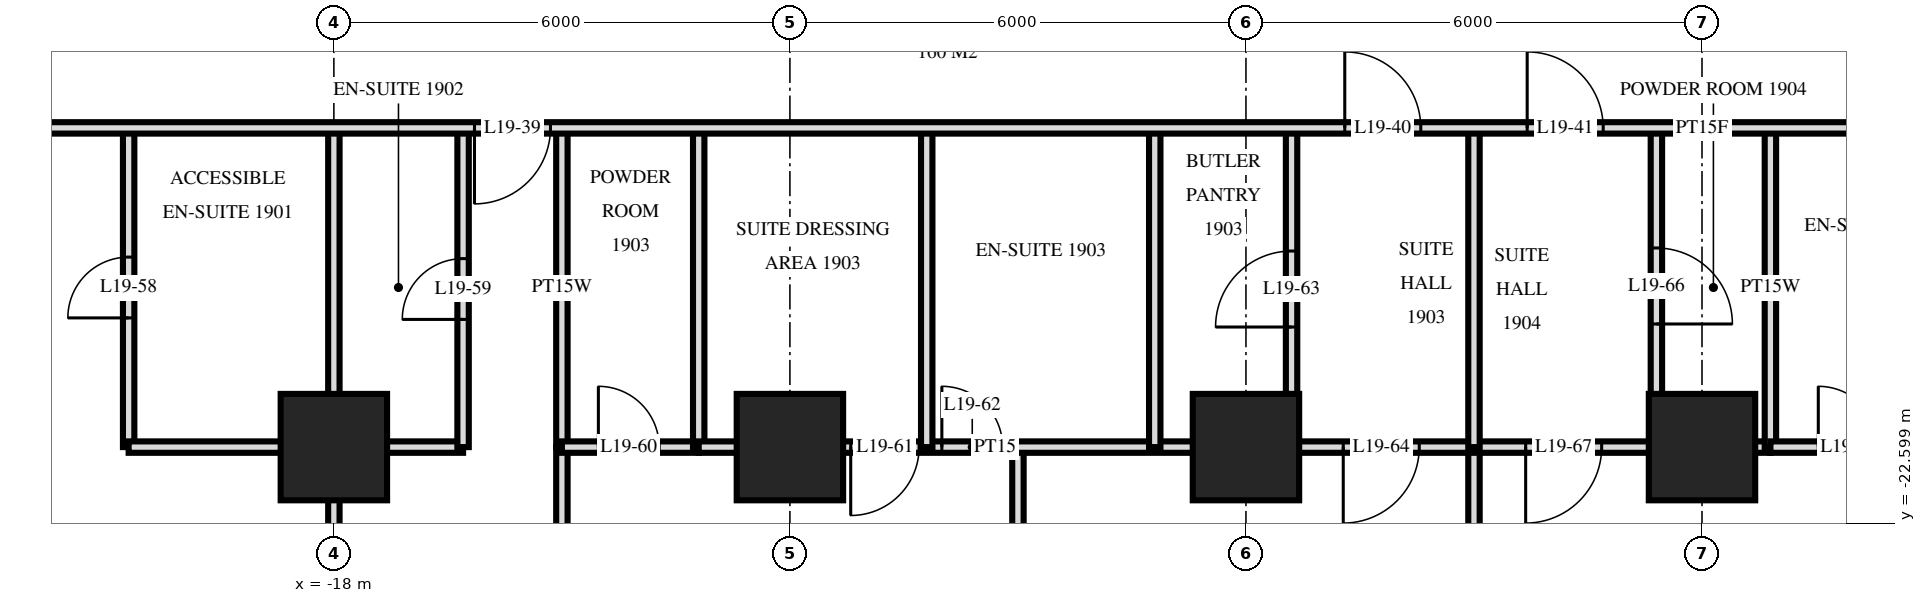
"""IFC4 building model, lengths in metres.
Left out: names, types, materials, properties, quantities, classifications, styles, units other than length and angle.
Written with IfcOpenShell. Run it as: python <this file> out.ifc"""

import sys

from ifc_helpers import new_model, si_unit, direction, frame, frame_2d, origin, origin_2d, place, context, subcontext, project, spatial, rectangle, extrude, element, fill, save


model = new_model("IFC4")
c1 = context("Model", 3, precision=1e-05, world=origin(), true_north=direction((0.0, 1.0)))
c2 = subcontext(c1, "Body", "Model", "MODEL_VIEW")
j1 = project(units=[si_unit("LENGTHUNIT", "METRE"), si_unit("PLANEANGLEUNIT", "RADIAN")], contexts=[c1])
p1 = place(None, origin())
s1 = spatial("IfcSite", under=j1, at=p1, CompositionType="ELEMENT")
p2 = place(p1, origin())
s2 = spatial("IfcBuilding", under=s1, at=p2, CompositionType="ELEMENT")
p3 = place(p2, frame((0.0, 0.0, 78.0)))
s3 = spatial("IfcBuildingStorey", under=s2, at=p3, CompositionType="ELEMENT", Elevation=78.0)
for number, where, z_axis, x_axis in (
    (1, (-18.0, -21.6, 0.0), (0.0, 0.0, 1.0), (1.0, 0.0, 0.0)),
    (2, (-12.0, -21.6, 0.0), (0.0, 0.0, 1.0), (1.0, 0.0, 0.0)),
    (3, (-6.0, -21.6, 0.0), (0.0, 0.0, 1.0), (1.0, 0.0, 0.0)),
    (4, (0.0, -21.6, 0.0), (0.0, 0.0, 1.0), (1.0, 0.0, 0.0)),
):
    element("IfcColumn", number, at=place(p3, frame(where, z_axis=z_axis, x_axis=x_axis)), inside=s3, PredefinedType="COLUMN", context=c2, shape_type="SweptSolid", body=[
        extrude(rectangle(XDim=1.4, YDim=1.4, at=origin_2d()), origin(), (0.0, 0.0, 1.0), 3.6),
    ])
p4 = place(p3, frame((0.9, -21.6, 0.0), z_axis=(0.0, 0.0, 1.0), x_axis=(0.0, 1.0, 0.0)))
e5 = element("IfcWall", 5, at=p4, inside=s3, PredefinedType="PLUMBINGWALL", context=c2, shape_type="SweptSolid", body=[
    extrude(rectangle(XDim=4.2, YDim=0.15, at=frame_2d((2.1, 0.0))), origin(), (0.0, 0.0, 1.0), 3.32),
])
p5 = place(p3, frame((-0.6, -21.6, 0.0), z_axis=(0.0, 0.0, 1.0), x_axis=(0.0, 1.0, 0.0)))
e6 = element("IfcWall", 6, at=p5, inside=s3, PredefinedType="PARTITIONING", context=c2, shape_type="SweptSolid", body=[
    extrude(rectangle(XDim=4.2, YDim=0.15, at=frame_2d((2.1, 0.0))), origin(), (0.0, 0.0, 1.0), 3.32),
])
p6 = place(p5, frame((1.62, 0.0, 0.0)))
e7 = element("IfcOpeningElement", 7, at=p6, cuts=e6, PredefinedType="OPENING", context=c2, shape_type="SweptSolid", body=[
    extrude(rectangle(XDim=1.0, YDim=2.1, at=frame_2d((0.5, 1.05))), frame((0.0, 0.085, 0.0), z_axis=(0.0, -1.0, 0.0), x_axis=(1.0, 0.0, 0.0)), (0.0, 0.0, 1.0), 0.17),
])
p7 = place(p3, frame((-3.0, -21.6, 0.0), z_axis=(0.0, 0.0, 1.0), x_axis=(0.0, 1.0, 0.0)))
e8 = element("IfcWall", 8, at=p7, inside=s3, PredefinedType="PARTITIONING", context=c2, shape_type="SweptSolid", body=[
    extrude(rectangle(XDim=4.2, YDim=0.15, at=frame_2d((2.1, 0.0))), origin(), (0.0, 0.0, 1.0), 3.32),
])
p8 = place(p3, frame((-3.0, -29.22, 0.0), z_axis=(0.0, 0.0, 1.0), x_axis=(0.0, 1.0, 0.0)))
e9 = element("IfcWall", 9, at=p8, inside=s3, PredefinedType="PARTITIONING", context=c2, shape_type="SweptSolid", body=[
    extrude(rectangle(XDim=7.62, YDim=0.15, at=frame_2d((3.81, 0.0))), origin(), (0.0, 0.0, 1.0), 3.32),
])
p9 = place(p3, frame((-5.4, -21.6, 0.0), z_axis=(0.0, 0.0, 1.0), x_axis=(0.0, 1.0, 0.0)))
e10 = element("IfcWall", 10, at=p9, inside=s3, PredefinedType="PARTITIONING", context=c2, shape_type="SweptSolid", body=[
    extrude(rectangle(XDim=4.2, YDim=0.15, at=frame_2d((2.1, 0.0))), origin(), (0.0, 0.0, 1.0), 3.32),
])
p10 = place(p9, frame((1.58, 0.0, 0.0)))
e11 = element("IfcOpeningElement", 11, at=p10, cuts=e10, PredefinedType="OPENING", context=c2, shape_type="SweptSolid", body=[
    extrude(rectangle(XDim=1.0, YDim=2.1, at=frame_2d((0.5, 1.05))), frame((0.0, 0.085, 0.0), z_axis=(0.0, -1.0, 0.0), x_axis=(1.0, 0.0, 0.0)), (0.0, 0.0, 1.0), 0.17),
])
p11 = place(p3, frame((-7.2, -21.6, 0.0), z_axis=(0.0, 0.0, 1.0), x_axis=(0.0, 1.0, 0.0)))
e12 = element("IfcWall", 12, at=p11, inside=s3, PredefinedType="PARTITIONING", context=c2, shape_type="SweptSolid", body=[
    extrude(rectangle(XDim=4.2, YDim=0.15, at=frame_2d((2.1, 0.0))), origin(), (0.0, 0.0, 1.0), 3.32),
])
p12 = place(p3, frame((-9.0, -29.22, 0.0), z_axis=(0.0, 0.0, 1.0), x_axis=(0.0, 1.0, 0.0)))
e13 = element("IfcWall", 13, at=p12, inside=s3, PredefinedType="PARTITIONING", context=c2, shape_type="SweptSolid", body=[
    extrude(rectangle(XDim=7.62, YDim=0.15, at=frame_2d((3.81, 0.0))), origin(), (0.0, 0.0, 1.0), 3.32),
])
p13 = place(p12, frame((3.27, 0.0, 0.0)))
e14 = element("IfcOpeningElement", 14, at=p13, cuts=e13, PredefinedType="OPENING", context=c2, shape_type="SweptSolid", body=[
    extrude(rectangle(XDim=0.9, YDim=2.1, at=frame_2d((0.45, 1.05))), frame((0.0, 0.085, 0.0), z_axis=(0.0, -1.0, 0.0), x_axis=(1.0, 0.0, 0.0)), (0.0, 0.0, 1.0), 0.17),
])
p14 = place(p3, frame((-10.2, -21.6, 0.0), z_axis=(0.0, 0.0, 1.0), x_axis=(0.0, 1.0, 0.0)))
e15 = element("IfcWall", 15, at=p14, inside=s3, PredefinedType="PARTITIONING", context=c2, shape_type="SweptSolid", body=[
    extrude(rectangle(XDim=4.2, YDim=0.15, at=frame_2d((2.1, 0.0))), origin(), (0.0, 0.0, 1.0), 3.32),
])
p15 = place(p3, frame((-13.2, -21.6, 0.0), z_axis=(0.0, 0.0, 1.0), x_axis=(0.0, 1.0, 0.0)))
e16 = element("IfcWall", 16, at=p15, inside=s3, PredefinedType="PLUMBINGWALL", context=c2, shape_type="SweptSolid", body=[
    extrude(rectangle(XDim=4.2, YDim=0.15, at=frame_2d((2.1, 0.0))), origin(), (0.0, 0.0, 1.0), 3.32),
])
p16 = place(p3, frame((-15.0, -29.22, 0.0), z_axis=(0.0, 0.0, 1.0), x_axis=(0.0, 1.0, 0.0)))
e17 = element("IfcWall", 17, at=p16, inside=s3, PredefinedType="PARTITIONING", context=c2, shape_type="SweptSolid", body=[
    extrude(rectangle(XDim=7.62, YDim=0.15, at=frame_2d((3.81, 0.0))), origin(), (0.0, 0.0, 1.0), 3.32),
])
p17 = place(p3, frame((-15.0, -21.6, 0.0), z_axis=(0.0, 0.0, 1.0), x_axis=(0.0, 1.0, 0.0)))
e18 = element("IfcWall", 18, at=p17, inside=s3, PredefinedType="PLUMBINGWALL", context=c2, shape_type="SweptSolid", body=[
    extrude(rectangle(XDim=4.2, YDim=0.15, at=frame_2d((2.1, 0.0))), origin(), (0.0, 0.0, 1.0), 3.32),
])
p18 = place(p3, frame((-16.3, -21.6, 0.0), z_axis=(0.0, 0.0, 1.0), x_axis=(0.0, 1.0, 0.0)))
e19 = element("IfcWall", 19, at=p18, inside=s3, PredefinedType="PARTITIONING", context=c2, shape_type="SweptSolid", body=[
    extrude(rectangle(XDim=4.2, YDim=0.15, at=frame_2d((2.1, 0.0))), origin(), (0.0, 0.0, 1.0), 3.32),
])
p19 = place(p18, frame((1.68, 0.0, 0.0)))
e20 = element("IfcOpeningElement", 20, at=p19, cuts=e19, PredefinedType="OPENING", context=c2, shape_type="SweptSolid", body=[
    extrude(rectangle(XDim=0.8, YDim=2.1, at=frame_2d((0.4, 1.05))), frame((0.0, 0.085, 0.0), z_axis=(0.0, -1.0, 0.0), x_axis=(1.0, 0.0, 0.0)), (0.0, 0.0, 1.0), 0.17),
])
p20 = place(p3, frame((-18.0, -29.22, 0.0), z_axis=(0.0, 0.0, 1.0), x_axis=(0.0, 1.0, 0.0)))
e21 = element("IfcWall", 21, at=p20, inside=s3, PredefinedType="PARTITIONING", context=c2, shape_type="SweptSolid", body=[
    extrude(rectangle(XDim=11.82, YDim=0.15, at=frame_2d((5.91, 0.0))), origin(), (0.0, 0.0, 1.0), 3.32),
])
p21 = place(p3, frame((-20.7, -21.6, 0.0), z_axis=(0.0, 0.0, 1.0), x_axis=(0.0, 1.0, 0.0)))
e22 = element("IfcWall", 22, at=p21, inside=s3, PredefinedType="PARTITIONING", context=c2, shape_type="SweptSolid", body=[
    extrude(rectangle(XDim=4.2, YDim=0.15, at=frame_2d((2.1, 0.0))), origin(), (0.0, 0.0, 1.0), 3.32),
])
p22 = place(p21, frame((1.7, 0.0, 0.0)))
e23 = element("IfcOpeningElement", 23, at=p22, cuts=e22, PredefinedType="OPENING", context=c2, shape_type="SweptSolid", body=[
    extrude(rectangle(XDim=0.8, YDim=2.1, at=frame_2d((0.4, 1.05))), frame((0.0, 0.085, 0.0), z_axis=(0.0, -1.0, 0.0), x_axis=(1.0, 0.0, 0.0)), (0.0, 0.0, 1.0), 0.17),
])
p23 = place(p3, frame((-5.4, -21.6, 0.0), z_axis=(0.0, 0.0, 1.0), x_axis=(1.0, 0.0, 0.0)))
e24 = element("IfcWall", 24, at=p23, inside=s3, PredefinedType="PARTITIONING", context=c2, shape_type="SweptSolid", body=[
    extrude(rectangle(XDim=4.8, YDim=0.15, at=frame_2d((2.4, 0.0))), origin(), (0.0, 0.0, 1.0), 3.32),
])
p24 = place(p23, frame((0.68, 0.0, 0.0)))
e25 = element("IfcOpeningElement", 25, at=p24, cuts=e24, PredefinedType="OPENING", context=c2, shape_type="SweptSolid", body=[
    extrude(rectangle(XDim=1.0, YDim=2.1, at=frame_2d((0.5, 1.05))), frame((0.0, 0.085, 0.0), z_axis=(0.0, -1.0, 0.0), x_axis=(1.0, 0.0, 0.0)), (0.0, 0.0, 1.0), 0.17),
])
p25 = place(p23, frame((3.08, 0.0, 0.0)))
e26 = element("IfcOpeningElement", 26, at=p25, cuts=e24, PredefinedType="OPENING", context=c2, shape_type="SweptSolid", body=[
    extrude(rectangle(XDim=1.0, YDim=2.1, at=frame_2d((0.5, 1.05))), frame((0.0, 0.085, 0.0), z_axis=(0.0, -1.0, 0.0), x_axis=(1.0, 0.0, 0.0)), (0.0, 0.0, 1.0), 0.17),
])
p26 = place(p3, frame((-20.7, -21.6, 0.0), z_axis=(0.0, 0.0, 1.0), x_axis=(1.0, 0.0, 0.0)))
e27 = element("IfcWall", 27, at=p26, inside=s3, PredefinedType="PARTITIONING", context=c2, shape_type="SweptSolid", body=[
    extrude(rectangle(XDim=4.4, YDim=0.15, at=frame_2d((2.2, 0.0))), origin(), (0.0, 0.0, 1.0), 3.32),
])
p27 = place(p3, frame((-13.2, -21.6, 0.0), z_axis=(0.0, 0.0, 1.0), x_axis=(1.0, 0.0, 0.0)))
e28 = element("IfcWall", 28, at=p27, inside=s3, PredefinedType="PARTITIONING", context=c2, shape_type="SweptSolid", body=[
    extrude(rectangle(XDim=7.8, YDim=0.15, at=frame_2d((3.9, 0.0))), origin(), (0.0, 0.0, 1.0), 3.32),
])
p28 = place(p27, frame((2.0, 0.0, 0.0)))
e29 = element("IfcOpeningElement", 29, at=p28, cuts=e28, PredefinedType="OPENING", context=c2, shape_type="SweptSolid", body=[
    extrude(rectangle(XDim=0.9, YDim=2.1, at=frame_2d((0.45, 1.05))), frame((0.0, 0.085, 0.0), z_axis=(0.0, -1.0, 0.0), x_axis=(1.0, 0.0, 0.0)), (0.0, 0.0, 1.0), 0.17),
])
p29 = place(p27, frame((3.199, 0.0, 0.0)))
e30 = element("IfcOpeningElement", 30, at=p29, cuts=e28, PredefinedType="OPENING", context=c2, shape_type="SweptSolid", body=[
    extrude(rectangle(XDim=0.8, YDim=2.1, at=frame_2d((0.4, 1.05))), frame((0.0, 0.085, 0.0), z_axis=(0.0, -1.0, 0.0), x_axis=(1.0, 0.0, 0.0)), (0.0, 0.0, 1.0), 0.17),
])
p30 = place(p3, frame((0.9, -21.6, 0.0), z_axis=(0.0, 0.0, 1.0), x_axis=(1.0, 0.0, 0.0)))
e31 = element("IfcWall", 31, at=p30, inside=s3, PredefinedType="PARTITIONING", context=c2, shape_type="SweptSolid", body=[
    extrude(rectangle(XDim=5.1, YDim=0.15, at=frame_2d((2.55, 0.0))), origin(), (0.0, 0.0, 1.0), 3.32),
])
p31 = place(p30, frame((0.63, 0.0, 0.0)))
e32 = element("IfcOpeningElement", 32, at=p31, cuts=e31, PredefinedType="OPENING", context=c2, shape_type="SweptSolid", body=[
    extrude(rectangle(XDim=0.8, YDim=2.1, at=frame_2d((0.4, 1.05))), frame((0.0, 0.085, 0.0), z_axis=(0.0, -1.0, 0.0), x_axis=(1.0, 0.0, 0.0)), (0.0, 0.0, 1.0), 0.17),
])
p32 = place(p30, frame((3.4, 0.0, 0.0)))
e33 = element("IfcOpeningElement", 33, at=p32, cuts=e31, PredefinedType="OPENING", context=c2, shape_type="SweptSolid", body=[
    extrude(rectangle(XDim=0.9, YDim=2.1, at=frame_2d((0.45, 1.05))), frame((0.0, 0.085, 0.0), z_axis=(0.0, -1.0, 0.0), x_axis=(1.0, 0.0, 0.0)), (0.0, 0.0, 1.0), 0.17),
])
p33 = place(p3, frame((-15.0, -21.6, 0.0), z_axis=(0.0, 0.0, 1.0), x_axis=(1.0, 0.0, 0.0)))
e34 = element("IfcWall", 34, at=p33, inside=s3, PredefinedType="PLUMBINGWALL", context=c2, shape_type="SweptSolid", body=[
    extrude(rectangle(XDim=1.8, YDim=0.15, at=frame_2d((0.9, 0.0))), origin(), (0.0, 0.0, 1.0), 3.32),
])
p34 = place(p33, frame((0.48, 0.0, 0.0)))
e35 = element("IfcOpeningElement", 35, at=p34, cuts=e34, PredefinedType="OPENING", context=c2, shape_type="SweptSolid", body=[
    extrude(rectangle(XDim=0.8, YDim=2.1, at=frame_2d((0.4, 1.05))), frame((0.0, 0.085, 0.0), z_axis=(0.0, -1.0, 0.0), x_axis=(1.0, 0.0, 0.0)), (0.0, 0.0, 1.0), 0.17),
])
p35 = place(p3, frame((-0.6, -21.6, 0.0), z_axis=(0.0, 0.0, 1.0), x_axis=(1.0, 0.0, 0.0)))
e36 = element("IfcWall", 36, at=p35, inside=s3, PredefinedType="PLUMBINGWALL", context=c2, shape_type="SweptSolid", body=[
    extrude(rectangle(XDim=1.5, YDim=0.15, at=frame_2d((0.75, 0.0))), origin(), (0.0, 0.0, 1.0), 3.32),
])
p36 = place(p3, frame((-33.12, -17.4, 0.0), z_axis=(0.0, 0.0, 1.0), x_axis=(1.0, 0.0, 0.0)))
e37 = element("IfcWall", 37, at=p36, inside=s3, PredefinedType="PARTITIONING", context=c2, shape_type="SweptSolid", body=[
    extrude(rectangle(XDim=66.24, YDim=0.15, at=frame_2d((33.12, 0.0))), origin(), (0.0, 0.0, 1.0), 3.32),
])
p37 = place(p36, frame((10.27, 0.0, 0.0)))
e38 = element("IfcOpeningElement", 38, at=p37, cuts=e37, PredefinedType="OPENING", context=c2, shape_type="SweptSolid", body=[
    extrude(rectangle(XDim=1.0, YDim=2.1, at=frame_2d((0.5, 1.05))), frame((0.0, 0.085, 0.0), z_axis=(0.0, -1.0, 0.0), x_axis=(1.0, 0.0, 0.0)), (0.0, 0.0, 1.0), 0.17),
])
p38 = place(p36, frame((16.97, 0.0, 0.0)))
e39 = element("IfcOpeningElement", 39, at=p38, cuts=e37, PredefinedType="OPENING", context=c2, shape_type="SweptSolid", body=[
    extrude(rectangle(XDim=1.0, YDim=2.1, at=frame_2d((0.5, 1.05))), frame((0.0, 0.085, 0.0), z_axis=(0.0, -1.0, 0.0), x_axis=(1.0, 0.0, 0.0)), (0.0, 0.0, 1.0), 0.17),
])
p39 = place(p36, frame((28.42, 0.0, 0.0)))
e40 = element("IfcOpeningElement", 40, at=p39, cuts=e37, PredefinedType="OPENING", context=c2, shape_type="SweptSolid", body=[
    extrude(rectangle(XDim=1.0, YDim=2.1, at=frame_2d((0.5, 1.05))), frame((0.0, 0.085, 0.0), z_axis=(0.0, -1.0, 0.0), x_axis=(1.0, 0.0, 0.0)), (0.0, 0.0, 1.0), 0.17),
])
p40 = place(p36, frame((30.82, 0.0, 0.0)))
e41 = element("IfcOpeningElement", 41, at=p40, cuts=e37, PredefinedType="OPENING", context=c2, shape_type="SweptSolid", body=[
    extrude(rectangle(XDim=1.0, YDim=2.1, at=frame_2d((0.5, 1.05))), frame((0.0, 0.085, 0.0), z_axis=(0.0, -1.0, 0.0), x_axis=(1.0, 0.0, 0.0)), (0.0, 0.0, 1.0), 0.17),
])
p41 = place(p36, frame((39.27, 0.0, 0.0)))
e42 = element("IfcOpeningElement", 42, at=p41, cuts=e37, PredefinedType="OPENING", context=c2, shape_type="SweptSolid", body=[
    extrude(rectangle(XDim=1.0, YDim=2.1, at=frame_2d((0.5, 1.05))), frame((0.0, 0.085, 0.0), z_axis=(0.0, -1.0, 0.0), x_axis=(1.0, 0.0, 0.0)), (0.0, 0.0, 1.0), 0.17),
])
p42 = place(p36, frame((45.22, 0.0, 0.0)))
e43 = element("IfcOpeningElement", 43, at=p42, cuts=e37, PredefinedType="OPENING", context=c2, shape_type="SweptSolid", body=[
    extrude(rectangle(XDim=1.0, YDim=2.1, at=frame_2d((0.5, 1.05))), frame((0.0, 0.085, 0.0), z_axis=(0.0, -1.0, 0.0), x_axis=(1.0, 0.0, 0.0)), (0.0, 0.0, 1.0), 0.17),
])
p43 = place(p36, frame((48.27, 0.0, 0.0)))
e44 = element("IfcOpeningElement", 44, at=p43, cuts=e37, PredefinedType="OPENING", context=c2, shape_type="SweptSolid", body=[
    extrude(rectangle(XDim=1.0, YDim=2.1, at=frame_2d((0.5, 1.05))), frame((0.0, 0.085, 0.0), z_axis=(0.0, -1.0, 0.0), x_axis=(1.0, 0.0, 0.0)), (0.0, 0.0, 1.0), 0.17),
])
p44 = place(p36, frame((1.87, 0.0, 0.0)))
e45 = element("IfcOpeningElement", 45, at=p44, cuts=e37, PredefinedType="OPENING", context=c2, shape_type="SweptSolid", body=[
    extrude(rectangle(XDim=1.0, YDim=2.1, at=frame_2d((0.5, 1.05))), frame((0.0, 0.085, 0.0), z_axis=(0.0, -1.0, 0.0), x_axis=(1.0, 0.0, 0.0)), (0.0, 0.0, 1.0), 0.17),
])
p45 = place(p36, frame((60.37, 0.0, 0.0)))
e46 = element("IfcOpeningElement", 46, at=p45, cuts=e37, PredefinedType="OPENING", context=c2, shape_type="SweptSolid", body=[
    extrude(rectangle(XDim=1.0, YDim=2.1, at=frame_2d((0.5, 1.05))), frame((0.0, 0.085, 0.0), z_axis=(0.0, -1.0, 0.0), x_axis=(1.0, 0.0, 0.0)), (0.0, 0.0, 1.0), 0.17),
])
p46 = place(p38, frame((0.5, 0.0, 0.0), z_axis=(0.0, 0.0, 1.0), x_axis=(-1.0, 0.0, 0.0)))
e47 = element("IfcDoor", 47, at=p46, inside=s3, OperationType="SINGLE_SWING_LEFT", PredefinedType="DOOR", context=c2, shape_type="SweptSolid", body=[
    extrude(rectangle(XDim=1.0, YDim=2.1, at=frame_2d((0.0, 1.05))), frame((0.0, -0.025, 0.0), z_axis=(0.0, 1.0, 0.0), x_axis=(-1.0, 0.0, 0.0)), (0.0, 0.0, 1.0), 0.05),
])
fill(e39, e47)
p47 = place(p39, origin())
e48 = element("IfcDoor", 48, at=p47, inside=s3, OperationType="SINGLE_SWING_RIGHT", PredefinedType="DOOR", context=c2, shape_type="SweptSolid", body=[
    extrude(rectangle(XDim=1.0, YDim=2.1, at=frame_2d((0.5, 1.05))), frame((0.0, 0.025, 0.0), z_axis=(0.0, -1.0, 0.0), x_axis=(1.0, 0.0, 0.0)), (0.0, 0.0, 1.0), 0.05),
])
fill(e40, e48)
p48 = place(p40, origin())
e49 = element("IfcDoor", 49, at=p48, inside=s3, OperationType="SINGLE_SWING_RIGHT", PredefinedType="DOOR", context=c2, shape_type="SweptSolid", body=[
    extrude(rectangle(XDim=1.0, YDim=2.1, at=frame_2d((0.5, 1.05))), frame((0.0, 0.025, 0.0), z_axis=(0.0, -1.0, 0.0), x_axis=(1.0, 0.0, 0.0)), (0.0, 0.0, 1.0), 0.05),
])
fill(e41, e49)
p49 = place(p22, origin())
e50 = element("IfcDoor", 50, at=p49, inside=s3, OperationType="SINGLE_SWING_RIGHT", PredefinedType="DOOR", context=c2, shape_type="SweptSolid", body=[
    extrude(rectangle(XDim=0.8, YDim=2.1, at=frame_2d((0.4, 1.05))), frame((0.0, 0.025, 0.0), z_axis=(0.0, -1.0, 0.0), x_axis=(1.0, 0.0, 0.0)), (0.0, 0.0, 1.0), 0.05),
])
fill(e23, e50)
p50 = place(p19, origin())
e51 = element("IfcDoor", 51, at=p50, inside=s3, OperationType="SINGLE_SWING_RIGHT", PredefinedType="DOOR", context=c2, shape_type="SweptSolid", body=[
    extrude(rectangle(XDim=0.8, YDim=2.1, at=frame_2d((0.4, 1.05))), frame((0.0, 0.025, 0.0), z_axis=(0.0, -1.0, 0.0), x_axis=(1.0, 0.0, 0.0)), (0.0, 0.0, 1.0), 0.05),
])
fill(e20, e51)
p51 = place(p34, origin())
e52 = element("IfcDoor", 52, at=p51, inside=s3, OperationType="SINGLE_SWING_RIGHT", PredefinedType="DOOR", context=c2, shape_type="SweptSolid", body=[
    extrude(rectangle(XDim=0.8, YDim=2.1, at=frame_2d((0.4, 1.05))), frame((0.0, 0.025, 0.0), z_axis=(0.0, -1.0, 0.0), x_axis=(1.0, 0.0, 0.0)), (0.0, 0.0, 1.0), 0.05),
])
fill(e35, e52)
p52 = place(p28, frame((0.45, 0.0, 0.0), z_axis=(0.0, 0.0, 1.0), x_axis=(-1.0, 0.0, 0.0)))
e53 = element("IfcDoor", 53, at=p52, inside=s3, OperationType="SINGLE_SWING_LEFT", PredefinedType="DOOR", context=c2, shape_type="SweptSolid", body=[
    extrude(rectangle(XDim=0.9, YDim=2.1, at=frame_2d((0.0, 1.05))), frame((0.0, -0.025, 0.0), z_axis=(0.0, 1.0, 0.0), x_axis=(-1.0, 0.0, 0.0)), (0.0, 0.0, 1.0), 0.05),
])
fill(e29, e53)
p53 = place(p29, origin())
e54 = element("IfcDoor", 54, at=p53, inside=s3, OperationType="SINGLE_SWING_RIGHT", PredefinedType="DOOR", context=c2, shape_type="SweptSolid", body=[
    extrude(rectangle(XDim=0.8, YDim=2.1, at=frame_2d((0.4, 1.05))), frame((0.0, 0.025, 0.0), z_axis=(0.0, -1.0, 0.0), x_axis=(1.0, 0.0, 0.0)), (0.0, 0.0, 1.0), 0.05),
])
fill(e30, e54)
p54 = place(p10, origin())
e55 = element("IfcDoor", 55, at=p54, inside=s3, OperationType="SINGLE_SWING_RIGHT", PredefinedType="DOOR", context=c2, shape_type="SweptSolid", body=[
    extrude(rectangle(XDim=1.0, YDim=2.1, at=frame_2d((0.5, 1.05))), frame((0.0, 0.025, 0.0), z_axis=(0.0, -1.0, 0.0), x_axis=(1.0, 0.0, 0.0)), (0.0, 0.0, 1.0), 0.05),
])
fill(e11, e55)
p55 = place(p24, frame((0.5, 0.0, 0.0), z_axis=(0.0, 0.0, 1.0), x_axis=(-1.0, 0.0, 0.0)))
e56 = element("IfcDoor", 56, at=p55, inside=s3, OperationType="SINGLE_SWING_LEFT", PredefinedType="DOOR", context=c2, shape_type="SweptSolid", body=[
    extrude(rectangle(XDim=1.0, YDim=2.1, at=frame_2d((0.0, 1.05))), frame((0.0, -0.025, 0.0), z_axis=(0.0, 1.0, 0.0), x_axis=(-1.0, 0.0, 0.0)), (0.0, 0.0, 1.0), 0.05),
])
fill(e25, e56)
p56 = place(p6, frame((0.5, 0.0, 0.0), z_axis=(0.0, 0.0, 1.0), x_axis=(-1.0, 0.0, 0.0)))
e57 = element("IfcDoor", 57, at=p56, inside=s3, OperationType="SINGLE_SWING_LEFT", PredefinedType="DOOR", context=c2, shape_type="SweptSolid", body=[
    extrude(rectangle(XDim=1.0, YDim=2.1, at=frame_2d((0.0, 1.05))), frame((0.0, -0.025, 0.0), z_axis=(0.0, 1.0, 0.0), x_axis=(-1.0, 0.0, 0.0)), (0.0, 0.0, 1.0), 0.05),
])
fill(e7, e57)
p57 = place(p25, frame((0.5, 0.0, 0.0), z_axis=(0.0, 0.0, 1.0), x_axis=(-1.0, 0.0, 0.0)))
e58 = element("IfcDoor", 58, at=p57, inside=s3, OperationType="SINGLE_SWING_LEFT", PredefinedType="DOOR", context=c2, shape_type="SweptSolid", body=[
    extrude(rectangle(XDim=1.0, YDim=2.1, at=frame_2d((0.0, 1.05))), frame((0.0, -0.025, 0.0), z_axis=(0.0, 1.0, 0.0), x_axis=(-1.0, 0.0, 0.0)), (0.0, 0.0, 1.0), 0.05),
])
fill(e26, e58)
p58 = place(p31, origin())
e59 = element("IfcDoor", 59, at=p58, inside=s3, OperationType="SINGLE_SWING_RIGHT", PredefinedType="DOOR", context=c2, shape_type="SweptSolid", body=[
    extrude(rectangle(XDim=0.8, YDim=2.1, at=frame_2d((0.4, 1.05))), frame((0.0, 0.025, 0.0), z_axis=(0.0, -1.0, 0.0), x_axis=(1.0, 0.0, 0.0)), (0.0, 0.0, 1.0), 0.05),
])
fill(e32, e59)
save(model, sys.argv[1])
